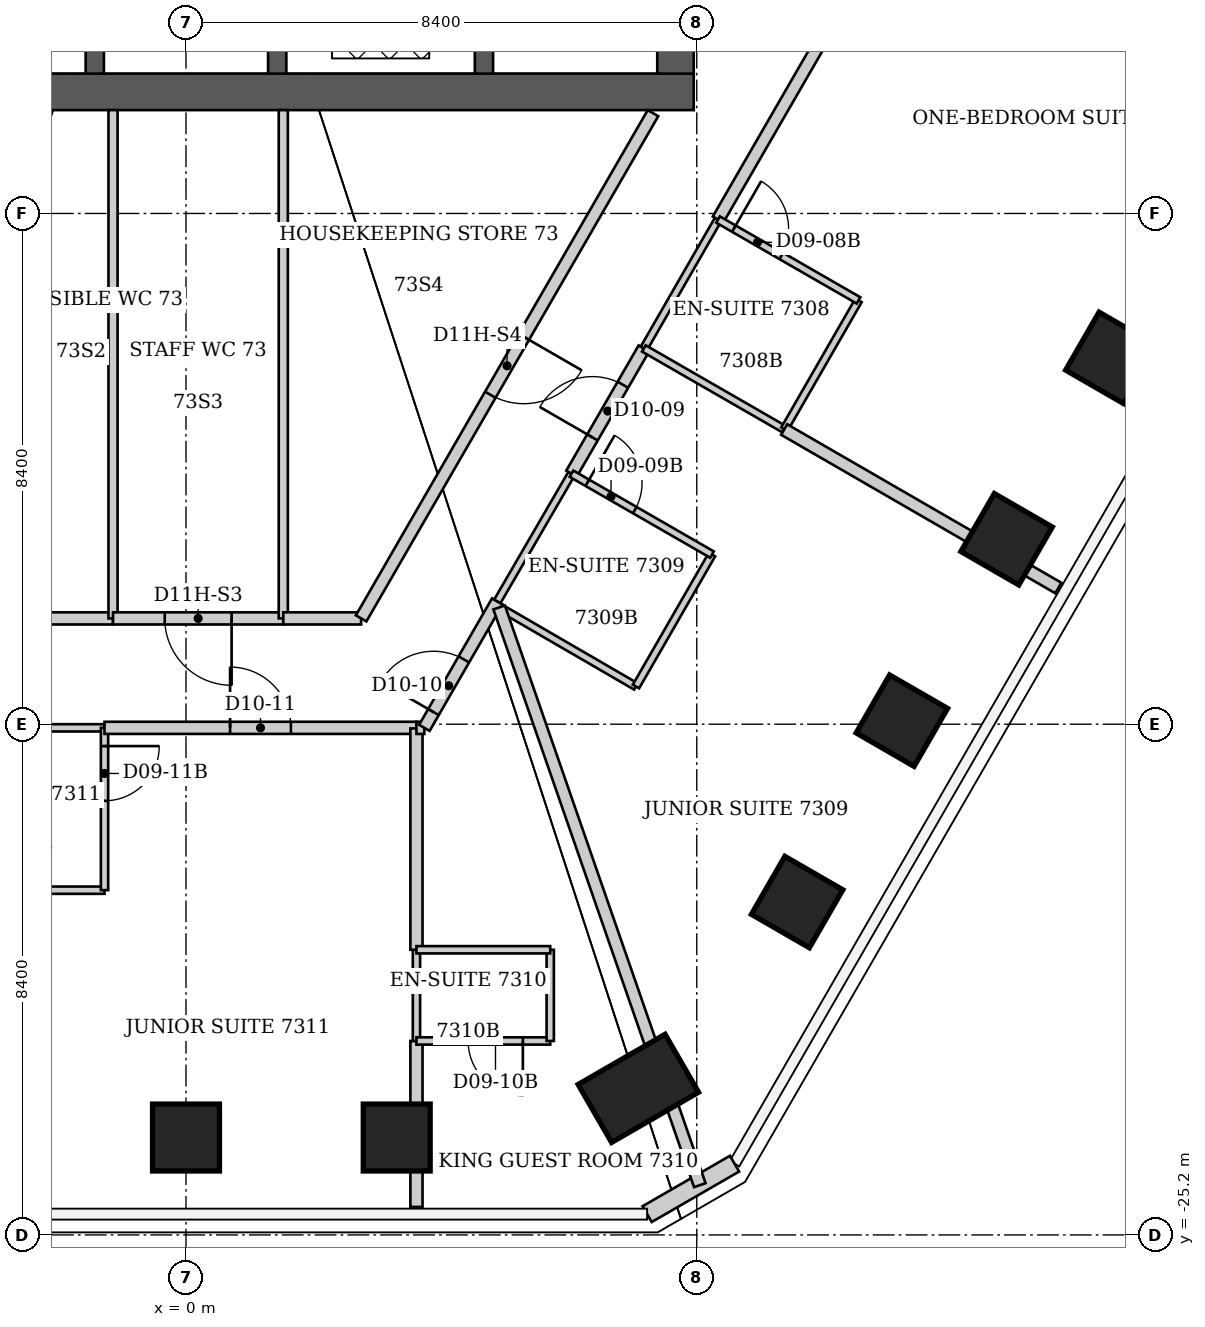
"""IFC4 building model, lengths in metres.
Left out: names, types, materials, properties, quantities, classifications, styles, units other than length and angle.
Written with IfcOpenShell. Run it as: python <this file> out.ifc"""

import sys

from ifc_helpers import new_model, si_unit, direction, frame, frame_2d, origin, origin_2d, place, context, subcontext, project, spatial, rectangle, extrude, element, fill, save


model = new_model("IFC4")
c1 = context("Model", 3, precision=1e-05, world=origin(), true_north=direction((0.0, 1.0)))
c2 = subcontext(c1, "Body", "Model", "MODEL_VIEW")
j1 = project(units=[si_unit("LENGTHUNIT", "METRE"), si_unit("PLANEANGLEUNIT", "RADIAN")], contexts=[c1])
p1 = place(None, origin())
s1 = spatial("IfcSite", under=j1, at=p1, CompositionType="ELEMENT")
p2 = place(p1, origin())
s2 = spatial("IfcBuilding", under=s1, at=p2, CompositionType="ELEMENT")
p3 = place(p2, frame((0.0, 0.0, 291.2)))
s3 = spatial("IfcBuildingStorey", under=s2, at=p3, CompositionType="ELEMENT", Elevation=291.2)
for number, where, z_axis, x_axis in (
    (1, (15.218, -10.775, 0.0), (0.0, 0.0, 1.0), (0.866, -0.5, 0.0)),
    (2, (13.495, -13.759, 0.0), (0.0, 0.0, 1.0), (0.866, -0.5, 0.0)),
    (3, (11.773, -16.742, 0.0), (0.0, 0.0, 1.0), (0.866, -0.5, 0.0)),
    (4, (10.05, -19.725, 0.0), (0.0, 0.0, 1.0), (0.866, -0.5, 0.0)),
):
    element("IfcColumn", number, at=place(p3, frame(where, z_axis=z_axis, x_axis=x_axis)), inside=s3, PredefinedType="COLUMN", context=c2, shape_type="SweptSolid", body=[
        extrude(rectangle(XDim=1.1, YDim=1.1, at=origin_2d()), origin(), (0.0, 0.0, 1.0), 3.8),
    ])
p4 = place(p3, frame((7.439, -22.79, 0.0), z_axis=(0.0, 0.0, 1.0), x_axis=(0.5, -0.866025403784, 0.0)))
e5 = element("IfcColumn", 5, at=p4, inside=s3, PredefinedType="COLUMN", context=c2, shape_type="SweptSolid", body=[
    extrude(rectangle(XDim=1.1, YDim=1.65, at=origin_2d()), origin(), (0.0, 0.0, 1.0), 3.8),
])
for number, where, z_axis, x_axis in (
    (6, (3.466, -23.598, 0.0), (0.0, 0.0, 1.0), (0.0, -1.0, 0.0)),
    (7, (0.0, -23.598, 0.0), (0.0, 0.0, 1.0), (0.0, -1.0, 0.0)),
):
    element("IfcColumn", number, at=place(p3, frame(where, z_axis=z_axis, x_axis=x_axis)), inside=s3, PredefinedType="COLUMN", context=c2, shape_type="SweptSolid", body=[
        extrude(rectangle(XDim=1.1, YDim=1.1, at=origin_2d()), origin(), (0.0, 0.0, 1.0), 3.8),
    ])
p5 = place(p3, frame((-8.35, -6.4, 0.0), z_axis=(0.0, 0.0, 1.0), x_axis=(1.0, 0.0, 0.0)))
e8 = element("IfcWall", 8, at=p5, inside=s3, PredefinedType="SHEAR", context=c2, shape_type="SweptSolid", body=[
    extrude(rectangle(XDim=16.7, YDim=0.6, at=frame_2d((8.35, 0.0))), origin(), (0.0, 0.0, 1.0), 3.8),
])
p6 = place(p3, frame((8.05, -6.1, 0.0), z_axis=(0.0, 0.0, 1.0), x_axis=(0.0, 1.0, 0.0)))
e9 = element("IfcWall", 9, at=p6, inside=s3, PredefinedType="SHEAR", context=c2, shape_type="SweptSolid", body=[
    extrude(rectangle(XDim=12.2, YDim=0.6, at=frame_2d((6.1, 0.0))), origin(), (0.0, 0.0, 1.0), 3.8),
])
p7 = place(p6, frame((7.6, 0.0, 0.0)))
e10 = element("IfcOpeningElement", 10, at=p7, cuts=e9, PredefinedType="OPENING", context=c2, shape_type="SweptSolid", body=[
    extrude(rectangle(XDim=1.2, YDim=2.2, at=frame_2d((0.6, 1.1))), frame((0.0, 0.3, 0.0), z_axis=(0.0, -1.0, 0.0), x_axis=(1.0, 0.0, 0.0)), (0.0, 0.0, 1.0), 0.6),
])
for number, where, z_axis, x_axis in (
    (11, (-1.5, -6.1, 0.0), (0.0, 0.0, 1.0), (0.0, 1.0, 0.0)),
    (12, (1.5, -6.1, 0.0), (0.0, 0.0, 1.0), (0.0, 1.0, 0.0)),
    (13, (4.9, -6.1, 0.0), (0.0, 0.0, 1.0), (0.0, 1.0, 0.0)),
):
    element("IfcWall", number, at=place(p3, frame(where, z_axis=z_axis, x_axis=x_axis)), inside=s3, PredefinedType="SHEAR", context=c2, shape_type="SweptSolid", body=[
        extrude(rectangle(XDim=7.2, YDim=0.3, at=frame_2d((3.6, 0.0))), origin(), (0.0, 0.0, 1.0), 3.8),
    ])
p8 = place(p3, frame((9.021, -24.028, 0.0), z_axis=(0.0, 0.0, 1.0), x_axis=(-0.865989634427, -0.500061949227, 0.0)))
e14 = element("IfcWall", 14, at=p8, inside=s3, PredefinedType="SOLIDWALL", context=c2, shape_type="SweptSolid", body=[
    extrude(rectangle(XDim=1.66, YDim=0.3, at=frame_2d((0.83, 0.0))), origin(), (0.0, 0.0, 1.0), 3.64),
])
for number, where, z_axis, x_axis in (
    (15, (-3.79, -19.53, 0.0), (0.0, 0.0, 1.0), (1.0, 0.0, 0.0)),
    (16, (-3.79, -16.86, 0.0), (0.0, 0.0, 1.0), (1.0, 0.0, 0.0)),
):
    element("IfcWall", number, at=place(p3, frame(where, z_axis=z_axis, x_axis=x_axis)), inside=s3, PredefinedType="PARTITIONING", context=c2, shape_type="SweptSolid", body=[
        extrude(rectangle(XDim=2.45, YDim=0.12, at=frame_2d((1.225, 0.0))), origin(), (0.0, 0.0, 1.0), 3.64),
    ])
p9 = place(p3, frame((-1.34, -19.53, 0.0), z_axis=(0.0, 0.0, 1.0), x_axis=(0.0, 1.0, 0.0)))
e17 = element("IfcWall", 17, at=p9, inside=s3, PredefinedType="PARTITIONING", context=c2, shape_type="SweptSolid", body=[
    extrude(rectangle(XDim=2.67, YDim=0.12, at=frame_2d((1.335, 0.0))), origin(), (0.0, 0.0, 1.0), 3.64),
])
p10 = place(p9, frame((1.47, 0.0, 0.0)))
e18 = element("IfcOpeningElement", 18, at=p10, cuts=e17, PredefinedType="OPENING", context=c2, shape_type="SweptSolid", body=[
    extrude(rectangle(XDim=0.9, YDim=2.03, at=frame_2d((0.45, 1.015))), frame((0.0, 0.06, 0.0), z_axis=(0.0, -1.0, 0.0), x_axis=(1.0, 0.0, 0.0)), (0.0, 0.0, 1.0), 0.12),
])
p11 = place(p3, frame((-1.34, -16.86, 0.0), z_axis=(0.0, 0.0, 1.0), x_axis=(1.0, 0.0, 0.0)))
e19 = element("IfcWall", 19, at=p11, inside=s3, PredefinedType="PARTITIONING", context=c2, shape_type="SweptSolid", body=[
    extrude(rectangle(XDim=5.13, YDim=0.2, at=frame_2d((2.565, 0.0))), origin(), (0.0, 0.0, 1.0), 3.64),
])
p12 = place(p11, frame((2.065, 0.0, 0.0)))
e20 = element("IfcOpeningElement", 20, at=p12, cuts=e19, PredefinedType="OPENING", context=c2, shape_type="SweptSolid", body=[
    extrude(rectangle(XDim=1.0, YDim=2.13, at=frame_2d((0.5, 1.065))), frame((0.0, 0.1, 0.0), z_axis=(0.0, -1.0, 0.0), x_axis=(1.0, 0.0, 0.0)), (0.0, 0.0, 1.0), 0.2),
])
p13 = place(p3, frame((-1.2, -15.06, 0.0), z_axis=(0.0, 0.0, 1.0), x_axis=(-1.0, 0.0, 0.0)))
e21 = element("IfcWall", 21, at=p13, inside=s3, PredefinedType="PARTITIONING", context=c2, shape_type="SweptSolid", body=[
    extrude(rectangle(XDim=1.68, YDim=0.2, at=frame_2d((0.84, 0.0))), origin(), (0.0, 0.0, 1.0), 3.64),
])
p14 = place(p3, frame((-1.2, -6.7, 0.0), z_axis=(0.0, 0.0, 1.0), x_axis=(0.0, -1.0, 0.0)))
e22 = element("IfcWall", 22, at=p14, inside=s3, PredefinedType="PARTITIONING", context=c2, shape_type="SweptSolid", body=[
    extrude(rectangle(XDim=8.36, YDim=0.15, at=frame_2d((4.18, 0.0))), origin(), (0.0, 0.0, 1.0), 3.64),
])
p15 = place(p3, frame((1.6, -15.06, 0.0), z_axis=(0.0, 0.0, 1.0), x_axis=(-1.0, 0.0, 0.0)))
e23 = element("IfcWall", 23, at=p15, inside=s3, PredefinedType="PARTITIONING", context=c2, shape_type="SweptSolid", body=[
    extrude(rectangle(XDim=2.8, YDim=0.2, at=frame_2d((1.4, 0.0))), origin(), (0.0, 0.0, 1.0), 3.64),
])
p16 = place(p15, frame((0.85, 0.0, 0.0)))
e24 = element("IfcOpeningElement", 24, at=p16, cuts=e23, PredefinedType="OPENING", context=c2, shape_type="SweptSolid", body=[
    extrude(rectangle(XDim=1.1, YDim=2.2, at=frame_2d((0.55, 1.1))), frame((0.0, 0.1, 0.0), z_axis=(0.0, -1.0, 0.0), x_axis=(1.0, 0.0, 0.0)), (0.0, 0.0, 1.0), 0.2),
])
p17 = place(p3, frame((1.6, -6.7, 0.0), z_axis=(0.0, 0.0, 1.0), x_axis=(0.0, -1.0, 0.0)))
e25 = element("IfcWall", 25, at=p17, inside=s3, PredefinedType="PARTITIONING", context=c2, shape_type="SweptSolid", body=[
    extrude(rectangle(XDim=8.36, YDim=0.15, at=frame_2d((4.18, 0.0))), origin(), (0.0, 0.0, 1.0), 2.86),
])
p18 = place(p3, frame((2.88, -15.06, 0.0), z_axis=(0.0, 0.0, 1.0), x_axis=(-1.0, 0.0, 0.0)))
e26 = element("IfcWall", 26, at=p18, inside=s3, PredefinedType="PARTITIONING", context=c2, shape_type="SweptSolid", body=[
    extrude(rectangle(XDim=1.28, YDim=0.2, at=frame_2d((0.64, 0.0))), origin(), (0.0, 0.0, 1.0), 3.64),
])
p19 = place(p3, frame((3.79, -24.74, 0.0), z_axis=(0.0, 0.0, 1.0), x_axis=(0.0, 1.0, 0.0)))
e27 = element("IfcWall", 27, at=p19, inside=s3, PredefinedType="PARTITIONING", context=c2, shape_type="SweptSolid", body=[
    extrude(rectangle(XDim=2.73, YDim=0.2, at=frame_2d((1.365, 0.0))), origin(), (0.0, 0.0, 1.0), 3.64),
])
p20 = place(p3, frame((3.79, -22.01, 0.0), z_axis=(0.0, 0.0, 1.0), x_axis=(0.0, 1.0, 0.0)))
e28 = element("IfcWall", 28, at=p20, inside=s3, PredefinedType="PARTITIONING", context=c2, shape_type="SweptSolid", body=[
    extrude(rectangle(XDim=1.5, YDim=0.12, at=frame_2d((0.75, 0.0))), origin(), (0.0, 0.0, 1.0), 3.64),
])
p21 = place(p3, frame((3.79, -22.01, 0.0), z_axis=(0.0, 0.0, 1.0), x_axis=(1.0, 0.0, 0.0)))
e29 = element("IfcWall", 29, at=p21, inside=s3, PredefinedType="PARTITIONING", context=c2, shape_type="SweptSolid", body=[
    extrude(rectangle(XDim=2.2, YDim=0.12, at=frame_2d((1.1, 0.0))), origin(), (0.0, 0.0, 1.0), 3.64),
])
p22 = place(p21, frame((0.85, 0.0, 0.0)))
e30 = element("IfcOpeningElement", 30, at=p22, cuts=e29, PredefinedType="OPENING", context=c2, shape_type="SweptSolid", body=[
    extrude(rectangle(XDim=0.9, YDim=2.03, at=frame_2d((0.45, 1.015))), frame((0.0, 0.06, 0.0), z_axis=(0.0, -1.0, 0.0), x_axis=(1.0, 0.0, 0.0)), (0.0, 0.0, 1.0), 0.12),
])
p23 = place(p3, frame((3.79, -20.51, 0.0), z_axis=(0.0, 0.0, 1.0), x_axis=(0.0, 1.0, 0.0)))
e31 = element("IfcWall", 31, at=p23, inside=s3, PredefinedType="PARTITIONING", context=c2, shape_type="SweptSolid", body=[
    extrude(rectangle(XDim=3.64, YDim=0.2, at=frame_2d((1.82, 0.0))), origin(), (0.0, 0.0, 1.0), 3.64),
])
p24 = place(p3, frame((3.79, -16.86, 0.0), z_axis=(0.0, 0.0, 1.0), x_axis=(1.0, 0.0, 0.0)))
e32 = element("IfcWall", 32, at=p24, inside=s3, PredefinedType="PARTITIONING", context=c2, shape_type="SweptSolid", body=[
    extrude(rectangle(XDim=0.13, YDim=0.2, at=frame_2d((0.065, 0.0))), origin(), (0.0, 0.0, 1.0), 3.64),
])
p25 = place(p3, frame((3.92, -16.86, 0.0), z_axis=(0.0, 0.0, 1.0), x_axis=(0.499693115345, 0.866202511239, 0.0)))
e33 = element("IfcWall", 33, at=p25, inside=s3, PredefinedType="PARTITIONING", context=c2, shape_type="SweptSolid", body=[
    extrude(rectangle(XDim=2.401, YDim=0.2, at=frame_2d((1.201, 0.0))), origin(), (0.0, 0.0, 1.0), 3.64),
])
p26 = place(p25, frame((0.3, 0.0, 0.0)))
e34 = element("IfcOpeningElement", 34, at=p26, cuts=e33, PredefinedType="OPENING", context=c2, shape_type="SweptSolid", body=[
    extrude(rectangle(XDim=1.0, YDim=2.13, at=frame_2d((0.5, 1.065))), frame((0.0, 0.1, 0.0), z_axis=(0.0, -1.0, 0.0), x_axis=(1.0, 0.0, 0.0)), (0.0, 0.0, 1.0), 0.2),
])
p27 = place(p3, frame((5.12, -14.78, 0.0), z_axis=(0.0, 0.0, 1.0), x_axis=(0.502307685327, 0.86468895521, 0.0)))
e35 = element("IfcWall", 35, at=p27, inside=s3, PredefinedType="PARTITIONING", context=c2, shape_type="SweptSolid", body=[
    extrude(rectangle(XDim=2.429, YDim=0.12, at=frame_2d((1.214, 0.0))), origin(), (0.0, 0.0, 1.0), 3.64),
])
p28 = place(p3, frame((5.233, -14.923, 0.0), z_axis=(0.0, 0.0, 1.0), x_axis=(0.864900876675, -0.501942699445, 0.0)))
e36 = element("IfcWall", 36, at=p28, inside=s3, PredefinedType="PARTITIONING", context=c2, shape_type="SweptSolid", body=[
    extrude(rectangle(XDim=2.505, YDim=0.12, at=frame_2d((1.252, 0.0))), origin(), (0.0, 0.0, 1.0), 3.038),
])
p29 = place(p3, frame((5.99, -22.01, 0.0), z_axis=(0.0, 0.0, 1.0), x_axis=(0.0, 1.0, 0.0)))
e37 = element("IfcWall", 37, at=p29, inside=s3, PredefinedType="PARTITIONING", context=c2, shape_type="SweptSolid", body=[
    extrude(rectangle(XDim=1.5, YDim=0.12, at=frame_2d((0.75, 0.0))), origin(), (0.0, 0.0, 1.0), 3.64),
])
p30 = place(p3, frame((5.99, -20.51, 0.0), z_axis=(0.0, 0.0, 1.0), x_axis=(-1.0, 0.0, 0.0)))
e38 = element("IfcWall", 38, at=p30, inside=s3, PredefinedType="PARTITIONING", context=c2, shape_type="SweptSolid", body=[
    extrude(rectangle(XDim=2.2, YDim=0.12, at=frame_2d((1.1, 0.0))), origin(), (0.0, 0.0, 1.0), 3.64),
])
p31 = place(p3, frame((6.34, -12.68, 0.0), z_axis=(0.0, 0.0, 1.0), x_axis=(0.500222880675, 0.865896685321, 0.0)))
e39 = element("IfcWall", 39, at=p31, inside=s3, PredefinedType="PARTITIONING", context=c2, shape_type="SweptSolid", body=[
    extrude(rectangle(XDim=2.379, YDim=0.2, at=frame_2d((1.189, 0.0))), origin(), (0.0, 0.0, 1.0), 3.64),
])
p32 = place(p31, frame((0.689, 0.0, 0.0)))
e40 = element("IfcOpeningElement", 40, at=p32, cuts=e39, PredefinedType="OPENING", context=c2, shape_type="SweptSolid", body=[
    extrude(rectangle(XDim=1.0, YDim=2.13, at=frame_2d((0.5, 1.065))), frame((0.0, 0.1, 0.0), z_axis=(0.0, -1.0, 0.0), x_axis=(1.0, 0.0, 0.0)), (0.0, 0.0, 1.0), 0.2),
])
p33 = place(p3, frame((7.4, -16.18, 0.0), z_axis=(0.0, 0.0, 1.0), x_axis=(0.499159685399, 0.866510016372, 0.0)))
e41 = element("IfcWall", 41, at=p33, inside=s3, PredefinedType="PARTITIONING", context=c2, shape_type="SweptSolid", body=[
    extrude(rectangle(XDim=2.504, YDim=0.12, at=frame_2d((1.252, 0.0))), origin(), (0.0, 0.0, 1.0), 3.64),
])
p34 = place(p3, frame((7.53, -10.62, 0.0), z_axis=(0.0, 0.0, 1.0), x_axis=(0.498748634132, 0.866746675766, 0.0)))
e42 = element("IfcWall", 42, at=p34, inside=s3, PredefinedType="PARTITIONING", context=c2, shape_type="SweptSolid", body=[
    extrude(rectangle(XDim=2.446, YDim=0.12, at=frame_2d((1.223, 0.0))), origin(), (0.0, 0.0, 1.0), 3.64),
])
p35 = place(p3, frame((7.53, -10.62, 0.0), z_axis=(0.0, 0.0, 1.0), x_axis=(0.866654860089, -0.498908161372, 0.0)))
e43 = element("IfcWall", 43, at=p35, inside=s3, PredefinedType="PARTITIONING", context=c2, shape_type="SweptSolid", body=[
    extrude(rectangle(XDim=2.666, YDim=0.12, at=frame_2d((1.333, 0.0))), origin(), (0.0, 0.0, 1.0), 3.64),
])
p36 = place(p3, frame((7.68, -6.75, 0.0), z_axis=(0.0, 0.0, 1.0), x_axis=(-0.500174600737, -0.865924574532, 0.0)))
e44 = element("IfcWall", 44, at=p36, inside=s3, PredefinedType="PARTITIONING", context=c2, shape_type="SweptSolid", body=[
    extrude(rectangle(XDim=9.597, YDim=0.2, at=frame_2d((4.798, 0.0))), origin(), (0.0, 0.0, 1.0), 3.64),
])
p37 = place(p36, frame((4.248, 0.0, 0.0)))
e45 = element("IfcOpeningElement", 45, at=p37, cuts=e44, PredefinedType="OPENING", context=c2, shape_type="SweptSolid", body=[
    extrude(rectangle(XDim=1.1, YDim=2.2, at=frame_2d((0.55, 1.1))), frame((0.0, 0.1, 0.0), z_axis=(0.0, -1.0, 0.0), x_axis=(1.0, 0.0, 0.0)), (0.0, 0.0, 1.0), 0.2),
])
p38 = place(p3, frame((8.45, -24.382, 0.0), z_axis=(0.0, 0.0, 1.0), x_axis=(-0.328108256954, 0.944640128154, 0.0)))
e46 = element("IfcWall", 46, at=p38, inside=s3, PredefinedType="PARTITIONING", context=c2, shape_type="SweptSolid", body=[
    extrude(rectangle(XDim=10.059, YDim=0.2, at=frame_2d((5.029, 0.0))), origin(), (0.0, 0.0, 1.0), 3.64),
])
p39 = place(p3, frame((8.65, -14.01, 0.0), z_axis=(0.0, 0.0, 1.0), x_axis=(-0.866592449628, 0.499016559092, 0.0)))
e47 = element("IfcWall", 47, at=p39, inside=s3, PredefinedType="PARTITIONING", context=c2, shape_type="SweptSolid", body=[
    extrude(rectangle(XDim=2.665, YDim=0.12, at=frame_2d((1.333, 0.0))), origin(), (0.0, 0.0, 1.0), 3.64),
])
p40 = place(p39, frame((1.466, 0.0, 0.0)))
e48 = element("IfcOpeningElement", 48, at=p40, cuts=e47, PredefinedType="OPENING", context=c2, shape_type="SweptSolid", body=[
    extrude(rectangle(XDim=0.9, YDim=2.03, at=frame_2d((0.45, 1.015))), frame((0.0, 0.06, 0.0), z_axis=(0.0, -1.0, 0.0), x_axis=(1.0, 0.0, 0.0)), (0.0, 0.0, 1.0), 0.12),
])
p41 = place(p3, frame((8.75, -8.5, 0.0), z_axis=(0.0, 0.0, 1.0), x_axis=(0.500093981358, 0.865971136822, 0.0)))
e49 = element("IfcWall", 49, at=p41, inside=s3, PredefinedType="PARTITIONING", context=c2, shape_type="SweptSolid", body=[
    extrude(rectangle(XDim=8.418, YDim=0.2, at=frame_2d((4.209, 0.0))), origin(), (0.0, 0.0, 1.0), 3.64),
])
p42 = place(p41, frame((3.709, 0.0, 0.0)))
e50 = element("IfcOpeningElement", 50, at=p42, cuts=e49, PredefinedType="OPENING", context=c2, shape_type="SweptSolid", body=[
    extrude(rectangle(XDim=1.0, YDim=2.13, at=frame_2d((0.5, 1.065))), frame((0.0, 0.1, 0.0), z_axis=(0.0, -1.0, 0.0), x_axis=(1.0, 0.0, 0.0)), (0.0, 0.0, 1.0), 0.2),
])
p43 = place(p3, frame((9.84, -11.95, 0.0), z_axis=(0.0, 0.0, 1.0), x_axis=(0.498791783817, 0.866721844883, 0.0)))
e51 = element("IfcWall", 51, at=p43, inside=s3, PredefinedType="PARTITIONING", context=c2, shape_type="SweptSolid", body=[
    extrude(rectangle(XDim=2.446, YDim=0.12, at=frame_2d((1.223, 0.0))), origin(), (0.0, 0.0, 1.0), 3.64),
])
p44 = place(p3, frame((11.06, -9.83, 0.0), z_axis=(0.0, 0.0, 1.0), x_axis=(-0.866615255992, 0.498976951453, 0.0)))
e52 = element("IfcWall", 52, at=p44, inside=s3, PredefinedType="PARTITIONING", context=c2, shape_type="SweptSolid", body=[
    extrude(rectangle(XDim=2.666, YDim=0.12, at=frame_2d((1.333, 0.0))), origin(), (0.0, 0.0, 1.0), 3.64),
])
p45 = place(p44, frame((1.466, 0.0, 0.0)))
e53 = element("IfcOpeningElement", 53, at=p45, cuts=e52, PredefinedType="OPENING", context=c2, shape_type="SweptSolid", body=[
    extrude(rectangle(XDim=0.9, YDim=2.03, at=frame_2d((0.45, 1.015))), frame((0.0, 0.06, 0.0), z_axis=(0.0, -1.0, 0.0), x_axis=(1.0, 0.0, 0.0)), (0.0, 0.0, 1.0), 0.12),
])
p46 = place(p3, frame((14.346, -14.56, 0.0), z_axis=(0.0, 0.0, 1.0), x_axis=(-0.86575990496, 0.500459575754, 0.0)))
e54 = element("IfcWall", 54, at=p46, inside=s3, PredefinedType="PARTITIONING", context=c2, shape_type="SweptSolid", body=[
    extrude(rectangle(XDim=5.208, YDim=0.2, at=frame_2d((2.604, 0.0))), origin(), (0.0, 0.0, 1.0), 3.64),
])
p47 = place(p45, origin())
e55 = element("IfcDoor", 55, at=p47, inside=s3, OperationType="SINGLE_SWING_RIGHT", PredefinedType="DOOR", context=c2, shape_type="SweptSolid", body=[
    extrude(rectangle(XDim=0.9, YDim=2.03, at=frame_2d((0.45, 1.015))), frame((0.0, 0.025, 0.0), z_axis=(0.0, -1.0, 0.0), x_axis=(1.0, 0.0, 0.0)), (0.0, 0.0, 1.0), 0.05),
])
fill(e53, e55)
p48 = place(p32, origin())
e56 = element("IfcDoor", 56, at=p48, inside=s3, OperationType="SINGLE_SWING_LEFT", PredefinedType="DOOR", context=c2, shape_type="SweptSolid", body=[
    extrude(rectangle(XDim=1.0, YDim=2.13, at=frame_2d((0.5, 1.065))), frame((0.0, 0.025, 0.0), z_axis=(0.0, -1.0, 0.0), x_axis=(1.0, 0.0, 0.0)), (0.0, 0.0, 1.0), 0.05),
])
fill(e40, e56)
p49 = place(p40, origin())
e57 = element("IfcDoor", 57, at=p49, inside=s3, OperationType="SINGLE_SWING_RIGHT", PredefinedType="DOOR", context=c2, shape_type="SweptSolid", body=[
    extrude(rectangle(XDim=0.9, YDim=2.03, at=frame_2d((0.45, 1.015))), frame((0.0, 0.025, 0.0), z_axis=(0.0, -1.0, 0.0), x_axis=(1.0, 0.0, 0.0)), (0.0, 0.0, 1.0), 0.05),
])
fill(e48, e57)
p50 = place(p26, origin())
e58 = element("IfcDoor", 58, at=p50, inside=s3, OperationType="SINGLE_SWING_LEFT", PredefinedType="DOOR", context=c2, shape_type="SweptSolid", body=[
    extrude(rectangle(XDim=1.0, YDim=2.13, at=frame_2d((0.5, 1.065))), frame((0.0, 0.025, 0.0), z_axis=(0.0, -1.0, 0.0), x_axis=(1.0, 0.0, 0.0)), (0.0, 0.0, 1.0), 0.05),
])
fill(e34, e58)
p51 = place(p22, origin())
e59 = element("IfcDoor", 59, at=p51, inside=s3, OperationType="SINGLE_SWING_RIGHT", PredefinedType="DOOR", context=c2, shape_type="SweptSolid", body=[
    extrude(rectangle(XDim=0.9, YDim=2.03, at=frame_2d((0.45, 1.015))), frame((0.0, 0.025, 0.0), z_axis=(0.0, -1.0, 0.0), x_axis=(1.0, 0.0, 0.0)), (0.0, 0.0, 1.0), 0.05),
])
fill(e30, e59)
p52 = place(p12, origin())
e60 = element("IfcDoor", 60, at=p52, inside=s3, OperationType="SINGLE_SWING_LEFT", PredefinedType="DOOR", context=c2, shape_type="SweptSolid", body=[
    extrude(rectangle(XDim=1.0, YDim=2.13, at=frame_2d((0.5, 1.065))), frame((0.0, 0.025, 0.0), z_axis=(0.0, -1.0, 0.0), x_axis=(1.0, 0.0, 0.0)), (0.0, 0.0, 1.0), 0.05),
])
fill(e20, e60)
p53 = place(p10, origin())
e61 = element("IfcDoor", 61, at=p53, inside=s3, OperationType="SINGLE_SWING_RIGHT", PredefinedType="DOOR", context=c2, shape_type="SweptSolid", body=[
    extrude(rectangle(XDim=0.9, YDim=2.03, at=frame_2d((0.45, 1.015))), frame((0.0, 0.025, 0.0), z_axis=(0.0, -1.0, 0.0), x_axis=(1.0, 0.0, 0.0)), (0.0, 0.0, 1.0), 0.05),
])
fill(e18, e61)
p54 = place(p16, origin())
e62 = element("IfcDoor", 62, at=p54, inside=s3, OperationType="SINGLE_SWING_LEFT", PredefinedType="DOOR", context=c2, shape_type="SweptSolid", body=[
    extrude(rectangle(XDim=1.1, YDim=2.2, at=frame_2d((0.55, 1.1))), frame((0.0, 0.025, 0.0), z_axis=(0.0, -1.0, 0.0), x_axis=(1.0, 0.0, 0.0)), (0.0, 0.0, 1.0), 0.05),
])
fill(e24, e62)
p55 = place(p37, origin())
e63 = element("IfcDoor", 63, at=p55, inside=s3, OperationType="SINGLE_SWING_LEFT", PredefinedType="DOOR", context=c2, shape_type="SweptSolid", body=[
    extrude(rectangle(XDim=1.1, YDim=2.2, at=frame_2d((0.55, 1.1))), frame((0.0, 0.025, 0.0), z_axis=(0.0, -1.0, 0.0), x_axis=(1.0, 0.0, 0.0)), (0.0, 0.0, 1.0), 0.05),
])
fill(e45, e63)
save(model, sys.argv[1])
